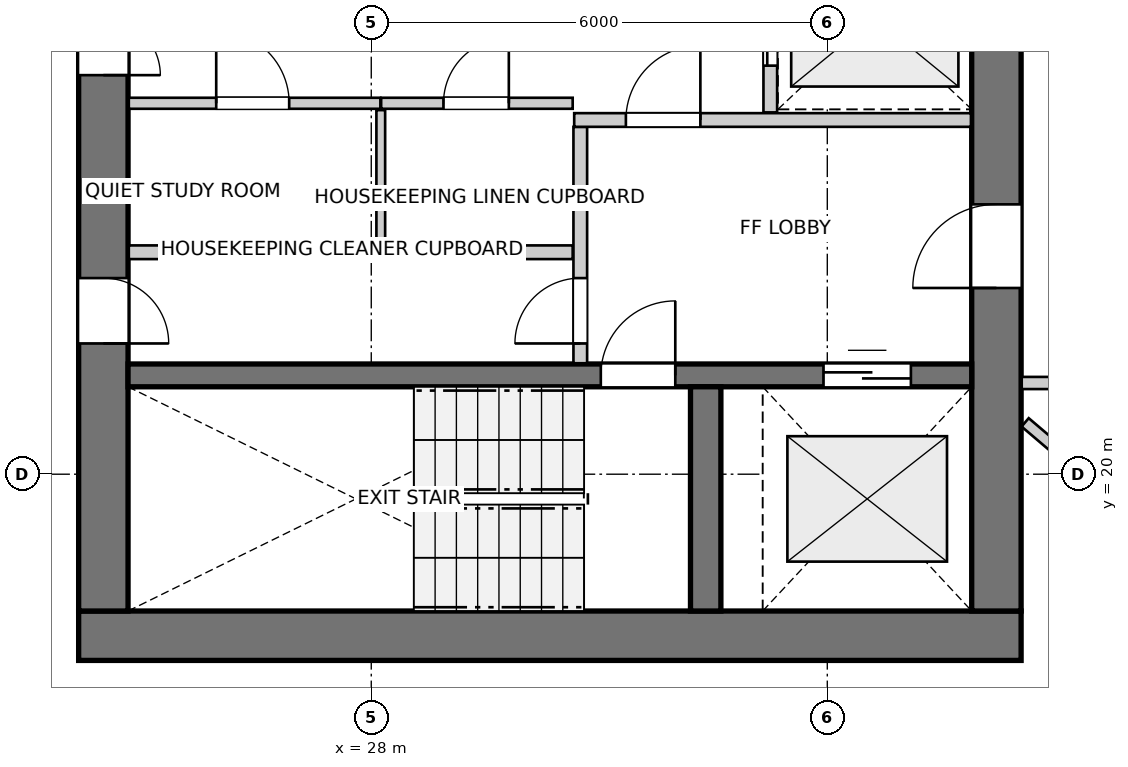
"""IFC4 building model, lengths in metres.
Left out: names, types, materials, properties, quantities, classifications, styles, units other than length and angle.
Written with IfcOpenShell. Run it as: python <this file> out.ifc"""

import sys

from ifc_helpers import new_model, si_unit, direction, frame, frame_2d, origin, place, context, subcontext, project, spatial, rectangle, extrude, source, transform, mapped, element, fill, save


model = new_model("IFC4")
c1 = context("Model", 3, precision=1e-05, world=origin(), true_north=direction((0.0, 1.0)))
c2 = subcontext(c1, "Body", "Model", "MODEL_VIEW")
j1 = project(units=[si_unit("LENGTHUNIT", "METRE"), si_unit("PLANEANGLEUNIT", "RADIAN")], contexts=[c1])
p1 = place(None, origin())
s1 = spatial("IfcSite", under=j1, at=p1, CompositionType="ELEMENT")
p2 = place(p1, origin())
s2 = spatial("IfcBuilding", under=s1, at=p2, CompositionType="ELEMENT")
p3 = place(p2, frame((0.0, 0.0, 168.2)))
s3 = spatial("IfcBuildingStorey", under=s2, at=p3, CompositionType="ELEMENT", Elevation=168.2)
p4 = place(p3, frame((24.15, 17.875, 0.0), z_axis=(0.0, 0.0, 1.0), x_axis=(1.0, 0.0, 0.0)))
e1 = element("IfcWall", 1, at=p4, inside=s3, PredefinedType="SHEAR", context=c2, shape_type="SweptSolid", body=[
    extrude(rectangle(XDim=12.4, YDim=0.65, at=frame_2d((6.2, 0.0))), origin(), (0.0, 0.0, 1.0), 2.95),
])
p5 = place(p3, frame((24.475, 33.8, 0.0), z_axis=(0.0, 0.0, 1.0), x_axis=(0.0, -1.0, 0.0)))
e2 = element("IfcWall", 2, at=p5, inside=s3, PredefinedType="SHEAR", context=c2, shape_type="SweptSolid", body=[
    extrude(rectangle(XDim=15.6, YDim=0.65, at=frame_2d((7.8, 0.0))), origin(), (0.0, 0.0, 1.0), 2.95),
])
p6 = place(p5, frame((7.05, 0.0, 0.0)))
e3 = element("IfcOpeningElement", 3, at=p6, cuts=e2, PredefinedType="OPENING", context=c2, shape_type="SweptSolid", body=[
    extrude(rectangle(XDim=1.5, YDim=2.15, at=frame_2d((0.75, 1.075))), frame((0.0, 0.335, 0.0), z_axis=(0.0, -1.0, 0.0), x_axis=(1.0, 0.0, 0.0)), (0.0, 0.0, 1.0), 0.67),
])
p7 = place(p5, frame((3.52, 0.0, 0.0)))
e4 = element("IfcOpeningElement", 4, at=p7, cuts=e2, PredefinedType="OPENING", context=c2, shape_type="SweptSolid", body=[
    extrude(rectangle(XDim=0.86, YDim=2.05, at=frame_2d((0.43, 1.025))), frame((0.0, 0.335, 0.0), z_axis=(0.0, -1.0, 0.0), x_axis=(1.0, 0.0, 0.0)), (0.0, 0.0, 1.0), 0.67),
])
p8 = place(p5, frame((11.22, 0.0, 0.0)))
e5 = element("IfcOpeningElement", 5, at=p8, cuts=e2, PredefinedType="OPENING", context=c2, shape_type="SweptSolid", body=[
    extrude(rectangle(XDim=0.86, YDim=2.05, at=frame_2d((0.43, 1.025))), frame((0.0, 0.335, 0.0), z_axis=(0.0, -1.0, 0.0), x_axis=(1.0, 0.0, 0.0)), (0.0, 0.0, 1.0), 0.67),
])
p9 = place(p3, frame((36.225, 18.2, 0.0), z_axis=(0.0, 0.0, 1.0), x_axis=(0.0, 1.0, 0.0)))
e6 = element("IfcWall", 6, at=p9, inside=s3, PredefinedType="SHEAR", context=c2, shape_type="SweptSolid", body=[
    extrude(rectangle(XDim=15.6, YDim=0.65, at=frame_2d((7.8, 0.0))), origin(), (0.0, 0.0, 1.0), 2.95),
])
p10 = place(p9, frame((4.25, 0.0, 0.0)))
e7 = element("IfcOpeningElement", 7, at=p10, cuts=e6, PredefinedType="OPENING", context=c2, shape_type="SweptSolid", body=[
    extrude(rectangle(XDim=1.1, YDim=2.15, at=frame_2d((0.55, 1.075))), frame((0.0, 0.335, 0.0), z_axis=(0.0, -1.0, 0.0), x_axis=(1.0, 0.0, 0.0)), (0.0, 0.0, 1.0), 0.67),
])
p11 = place(p9, frame((10.25, 0.0, 0.0)))
e8 = element("IfcOpeningElement", 8, at=p11, cuts=e6, PredefinedType="OPENING", context=c2, shape_type="SweptSolid", body=[
    extrude(rectangle(XDim=1.1, YDim=2.15, at=frame_2d((0.55, 1.075))), frame((0.0, 0.335, 0.0), z_axis=(0.0, -1.0, 0.0), x_axis=(1.0, 0.0, 0.0)), (0.0, 0.0, 1.0), 0.67),
])
p12 = place(p3, frame((24.8, 21.3, 0.0), z_axis=(0.0, 0.0, 1.0), x_axis=(1.0, 0.0, 0.0)))
e9 = element("IfcWall", 9, at=p12, inside=s3, PredefinedType="SHEAR", context=c2, shape_type="SweptSolid", body=[
    extrude(rectangle(XDim=11.1, YDim=0.3, at=frame_2d((5.55, 0.0))), origin(), (0.0, 0.0, 1.0), 2.95),
])
p13 = place(p12, frame((6.22, 0.0, 0.0)))
e10 = element("IfcOpeningElement", 10, at=p13, cuts=e9, PredefinedType="OPENING", context=c2, shape_type="SweptSolid", body=[
    extrude(rectangle(XDim=0.98, YDim=2.15, at=frame_2d((0.49, 1.075))), frame((0.0, 0.16, 0.0), z_axis=(0.0, -1.0, 0.0), x_axis=(1.0, 0.0, 0.0)), (0.0, 0.0, 1.0), 0.32),
])
p14 = place(p12, frame((9.15, 0.0, 0.0)))
e11 = element("IfcOpeningElement", 11, at=p14, cuts=e9, PredefinedType="OPENING", context=c2, shape_type="SweptSolid", body=[
    extrude(rectangle(XDim=1.15, YDim=2.15, at=frame_2d((0.575, 1.075))), frame((0.0, 0.16, 0.0), z_axis=(0.0, -1.0, 0.0), x_axis=(1.0, 0.0, 0.0)), (0.0, 0.0, 1.0), 0.32),
])
p15 = place(p3, frame((32.4, 18.2, 0.0), z_axis=(0.0, 0.0, 1.0), x_axis=(0.0, 1.0, 0.0)))
e12 = element("IfcWall", 12, at=p15, inside=s3, PredefinedType="SHEAR", context=c2, shape_type="SweptSolid", body=[
    extrude(rectangle(XDim=2.95, YDim=0.4, at=frame_2d((1.475, 0.0))), origin(), (0.0, 0.0, 1.0), 2.95),
])
p16 = place(p3, frame((30.75, 21.46, 0.0), z_axis=(0.0, 0.0, 1.0), x_axis=(0.0, 1.0, 0.0)))
e13 = element("IfcWall", 13, at=p16, inside=s3, PredefinedType="PARTITIONING", context=c2, shape_type="SweptSolid", body=[
    extrude(rectangle(XDim=3.11, YDim=0.18, at=frame_2d((1.555, 0.0))), origin(), (0.0, 0.0, 1.0), 2.95),
])
p17 = place(p16, frame((0.26, 0.0, 0.0)))
e14 = element("IfcOpeningElement", 14, at=p17, cuts=e13, PredefinedType="OPENING", context=c2, shape_type="SweptSolid", body=[
    extrude(rectangle(XDim=0.86, YDim=2.05, at=frame_2d((0.43, 1.025))), frame((0.0, 0.1, 0.0), z_axis=(0.0, -1.0, 0.0), x_axis=(1.0, 0.0, 0.0)), (0.0, 0.0, 1.0), 0.2),
])
p18 = place(p3, frame((30.67, 24.66, 0.0), z_axis=(0.0, 0.0, 1.0), x_axis=(1.0, 0.0, 0.0)))
e15 = element("IfcWall", 15, at=p18, inside=s3, PredefinedType="PARTITIONING", context=c2, shape_type="SweptSolid", body=[
    extrude(rectangle(XDim=5.22, YDim=0.18, at=frame_2d((2.61, 0.0))), origin(), (0.0, 0.0, 1.0), 2.95),
])
p19 = place(p18, frame((0.68, 0.0, 0.0)))
e16 = element("IfcOpeningElement", 16, at=p19, cuts=e15, PredefinedType="OPENING", context=c2, shape_type="SweptSolid", body=[
    extrude(rectangle(XDim=0.98, YDim=2.15, at=frame_2d((0.49, 1.075))), frame((0.0, 0.1, 0.0), z_axis=(0.0, -1.0, 0.0), x_axis=(1.0, 0.0, 0.0)), (0.0, 0.0, 1.0), 0.2),
])
p20 = place(p3, frame((33.25, 24.76, 0.0), z_axis=(0.0, 0.0, 1.0), x_axis=(0.0, 1.0, 0.0)))
e17 = element("IfcWall", 17, at=p20, inside=s3, PredefinedType="PARTITIONING", context=c2, shape_type="SweptSolid", body=[
    extrude(rectangle(XDim=2.48, YDim=0.18, at=frame_2d((1.24, 0.0))), origin(), (0.0, 0.0, 1.0), 2.95),
])
p21 = place(p20, frame((0.615, 0.0, 0.0)))
e18 = element("IfcOpeningElement", 18, at=p21, cuts=e17, PredefinedType="OPENING", context=c2, shape_type="SweptSolid", body=[
    extrude(rectangle(XDim=1.25, YDim=2.15, at=frame_2d((0.625, 1.075))), frame((0.0, 0.1, 0.0), z_axis=(0.0, -1.0, 0.0), x_axis=(1.0, 0.0, 0.0)), (0.0, 0.0, 1.0), 0.2),
])
p22 = place(p3, frame((24.81, 22.92, 0.0), z_axis=(0.0, 0.0, 1.0), x_axis=(1.0, 0.0, 0.0)))
e19 = element("IfcWall", 19, at=p22, inside=s3, PredefinedType="PARTITIONING", context=c2, shape_type="SweptSolid", body=[
    extrude(rectangle(XDim=5.84, YDim=0.18, at=frame_2d((2.92, 0.0))), origin(), (0.0, 0.0, 1.0), 2.95),
])
p23 = place(p3, frame((24.81, 24.88, 0.0), z_axis=(0.0, 0.0, 1.0), x_axis=(1.0, 0.0, 0.0)))
e20 = element("IfcWall", 20, at=p23, inside=s3, PredefinedType="PARTITIONING", context=c2, shape_type="SweptSolid", body=[
    extrude(rectangle(XDim=3.31, YDim=0.145, at=frame_2d((1.655, 0.0))), origin(), (0.0, 0.0, 1.0), 2.95),
])
p24 = place(p23, frame((1.15, 0.0, 0.0)))
e21 = element("IfcOpeningElement", 21, at=p24, cuts=e20, PredefinedType="OPENING", context=c2, shape_type="SweptSolid", body=[
    extrude(rectangle(XDim=0.96, YDim=2.1, at=frame_2d((0.48, 1.05))), frame((0.0, 0.083, 0.0), z_axis=(0.0, -1.0, 0.0), x_axis=(1.0, 0.0, 0.0)), (0.0, 0.0, 1.0), 0.165),
])
p25 = place(p3, frame((28.13, 24.88, 0.0), z_axis=(0.0, 0.0, 1.0), x_axis=(1.0, 0.0, 0.0)))
e22 = element("IfcWall", 22, at=p25, inside=s3, PredefinedType="PARTITIONING", context=c2, shape_type="SweptSolid", body=[
    extrude(rectangle(XDim=2.52, YDim=0.145, at=frame_2d((1.26, 0.0))), origin(), (0.0, 0.0, 1.0), 2.95),
])
p26 = place(p25, frame((0.82, 0.0, 0.0)))
e23 = element("IfcOpeningElement", 23, at=p26, cuts=e22, PredefinedType="OPENING", context=c2, shape_type="SweptSolid", body=[
    extrude(rectangle(XDim=0.86, YDim=2.05, at=frame_2d((0.43, 1.025))), frame((0.0, 0.083, 0.0), z_axis=(0.0, -1.0, 0.0), x_axis=(1.0, 0.0, 0.0)), (0.0, 0.0, 1.0), 0.165),
])
p27 = place(p3, frame((28.125, 23.02, 0.0), z_axis=(0.0, 0.0, 1.0), x_axis=(0.0, 1.0, 0.0)))
e24 = element("IfcWall", 24, at=p27, inside=s3, PredefinedType="PARTITIONING", context=c2, shape_type="SweptSolid", body=[
    extrude(rectangle(XDim=1.77, YDim=0.115, at=frame_2d((0.885, 0.0))), origin(), (0.0, 0.0, 1.0), 2.95),
])
p28 = place(p3, frame((36.603, 20.682, 0.0), z_axis=(0.0, 0.0, 1.0), x_axis=(0.761710074833, -0.647918020971, 0.0)))
e25 = element("IfcWall", 25, at=p28, inside=s3, PredefinedType="PARTITIONING", context=c2, shape_type="SweptSolid", body=[
    extrude(rectangle(XDim=7.359, YDim=0.145, at=frame_2d((3.68, 0.0))), origin(), (0.0, 0.0, 1.0), 2.95),
])
p29 = place(p3, frame((36.558, 21.2, 0.0), z_axis=(0.0, 0.0, 1.0), x_axis=(1.0, 0.0, 0.0)))
e26 = element("IfcWall", 26, at=p29, inside=s3, PredefinedType="PARTITIONING", context=c2, shape_type="SweptSolid", body=[
    extrude(rectangle(XDim=1.684, YDim=0.16, at=frame_2d((0.842, 0.0))), origin(), (0.0, 0.0, 1.0), 2.95),
])
m1 = source(origin(), c2, "Body", "SweptSolid", [
    extrude(rectangle(XDim=0.98, YDim=2.15, at=frame_2d((0.49, 1.075))), frame((0.0, 0.025, 0.0), z_axis=(0.0, -1.0, 0.0), x_axis=(1.0, 0.0, 0.0)), (0.0, 0.0, 1.0), 0.05),
])
p30 = place(p13, origin())
e27 = element("IfcDoor", 27, at=p30, inside=s3, OperationType="SINGLE_SWING_RIGHT", PredefinedType="DOOR", context=c2, shape_type="MappedRepresentation", body=[
    mapped(m1, transform((0.0, 0.0, 0.0), x_axis=(1.0, 0.0, 0.0), y_axis=(0.0, 1.0, 0.0), z_axis=(0.0, 0.0, 1.0), scale=1.0)),
])
fill(e10, e27)
m2 = source(origin(), c2, "Body", "SweptSolid", [
    extrude(rectangle(XDim=1.15, YDim=2.15, at=frame_2d((0.575, 1.075))), frame((0.0, 0.025, 0.0), z_axis=(0.0, -1.0, 0.0), x_axis=(1.0, 0.0, 0.0)), (0.0, 0.0, 1.0), 0.05),
])
p31 = place(p14, origin())
e28 = element("IfcDoor", 28, at=p31, inside=s3, OperationType="DOUBLE_DOOR_SLIDING", PredefinedType="DOOR", context=c2, shape_type="MappedRepresentation", body=[
    mapped(m2, transform((0.0, 0.0, 0.0), x_axis=(1.0, 0.0, 0.0), y_axis=(0.0, 1.0, 0.0), z_axis=(0.0, 0.0, 1.0), scale=1.0)),
])
fill(e11, e28)
m3 = source(origin(), c2, "Body", "SweptSolid", [
    extrude(rectangle(XDim=1.1, YDim=2.15, at=frame_2d((0.55, 1.075))), frame((0.0, 0.025, 0.0), z_axis=(0.0, -1.0, 0.0), x_axis=(1.0, 0.0, 0.0)), (0.0, 0.0, 1.0), 0.05),
])
p32 = place(p10, origin())
e29 = element("IfcDoor", 29, at=p32, inside=s3, OperationType="SINGLE_SWING_LEFT", PredefinedType="DOOR", context=c2, shape_type="MappedRepresentation", body=[
    mapped(m3, transform((0.0, 0.0, 0.0), x_axis=(1.0, 0.0, 0.0), y_axis=(0.0, 1.0, 0.0), z_axis=(0.0, 0.0, 1.0), scale=1.0)),
])
fill(e7, e29)
m4 = source(origin(), c2, "Body", "SweptSolid", [
    extrude(rectangle(XDim=1.5, YDim=2.15, at=frame_2d((0.75, 1.075))), frame((0.0, 0.025, 0.0), z_axis=(0.0, -1.0, 0.0), x_axis=(1.0, 0.0, 0.0)), (0.0, 0.0, 1.0), 0.05),
])
p33 = place(p6, origin())
e30 = element("IfcDoor", 30, at=p33, inside=s3, OperationType="DOUBLE_DOOR_SINGLE_SWING", PredefinedType="DOOR", context=c2, shape_type="MappedRepresentation", body=[
    mapped(m4, transform((0.0, 0.0, 0.0), x_axis=(1.0, 0.0, 0.0), y_axis=(0.0, 1.0, 0.0), z_axis=(0.0, 0.0, 1.0), scale=1.0)),
])
fill(e3, e30)
m5 = source(origin(), c2, "Body", "SweptSolid", [
    extrude(rectangle(XDim=0.86, YDim=2.05, at=frame_2d((0.43, 1.025))), frame((0.0, 0.025, 0.0), z_axis=(0.0, -1.0, 0.0), x_axis=(1.0, 0.0, 0.0)), (0.0, 0.0, 1.0), 0.05),
])
p34 = place(p8, origin())
e31 = element("IfcDoor", 31, at=p34, inside=s3, OperationType="SINGLE_SWING_RIGHT", PredefinedType="DOOR", context=c2, shape_type="MappedRepresentation", body=[
    mapped(m5, transform((0.0, 0.0, 0.0), x_axis=(1.0, 0.0, 0.0), y_axis=(0.0, 1.0, 0.0), z_axis=(0.0, 0.0, 1.0), scale=1.0)),
])
fill(e5, e31)
p35 = place(p17, origin())
e32 = element("IfcDoor", 32, at=p35, inside=s3, OperationType="SINGLE_SWING_LEFT", PredefinedType="DOOR", context=c2, shape_type="MappedRepresentation", body=[
    mapped(m5, transform((0.0, 0.0, 0.0), x_axis=(1.0, 0.0, 0.0), y_axis=(0.0, 1.0, 0.0), z_axis=(0.0, 0.0, 1.0), scale=1.0)),
])
fill(e14, e32)
p36 = place(p19, origin())
e33 = element("IfcDoor", 33, at=p36, inside=s3, OperationType="SINGLE_SWING_RIGHT", PredefinedType="DOOR", context=c2, shape_type="MappedRepresentation", body=[
    mapped(m1, transform((0.0, 0.0, 0.0), x_axis=(1.0, 0.0, 0.0), y_axis=(0.0, 1.0, 0.0), z_axis=(0.0, 0.0, 1.0), scale=1.0)),
])
fill(e16, e33)
m6 = source(origin(), c2, "Body", "SweptSolid", [
    extrude(rectangle(XDim=1.25, YDim=2.15, at=frame_2d((0.625, 1.075))), frame((0.0, 0.025, 0.0), z_axis=(0.0, -1.0, 0.0), x_axis=(1.0, 0.0, 0.0)), (0.0, 0.0, 1.0), 0.05),
])
p37 = place(p21, origin())
e34 = element("IfcDoor", 34, at=p37, inside=s3, OperationType="DOUBLE_DOOR_SLIDING", PredefinedType="DOOR", context=c2, shape_type="MappedRepresentation", body=[
    mapped(m6, transform((0.0, 0.0, 0.0), x_axis=(1.0, 0.0, 0.0), y_axis=(0.0, 1.0, 0.0), z_axis=(0.0, 0.0, 1.0), scale=1.0)),
])
fill(e18, e34)
m7 = source(origin(), c2, "Body", "SweptSolid", [
    extrude(rectangle(XDim=0.96, YDim=2.1, at=frame_2d((0.48, 1.05))), frame((0.0, 0.025, 0.0), z_axis=(0.0, -1.0, 0.0), x_axis=(1.0, 0.0, 0.0)), (0.0, 0.0, 1.0), 0.05),
])
p38 = place(p24, origin())
e35 = element("IfcDoor", 35, at=p38, inside=s3, OperationType="SINGLE_SWING_LEFT", PredefinedType="DOOR", context=c2, shape_type="MappedRepresentation", body=[
    mapped(m7, transform((0.0, 0.0, 0.0), x_axis=(1.0, 0.0, 0.0), y_axis=(0.0, 1.0, 0.0), z_axis=(0.0, 0.0, 1.0), scale=1.0)),
])
fill(e21, e35)
p39 = place(p26, origin())
e36 = element("IfcDoor", 36, at=p39, inside=s3, OperationType="SINGLE_SWING_RIGHT", PredefinedType="DOOR", context=c2, shape_type="MappedRepresentation", body=[
    mapped(m5, transform((0.0, 0.0, 0.0), x_axis=(1.0, 0.0, 0.0), y_axis=(0.0, 1.0, 0.0), z_axis=(0.0, 0.0, 1.0), scale=1.0)),
])
fill(e23, e36)
save(model, sys.argv[1])
